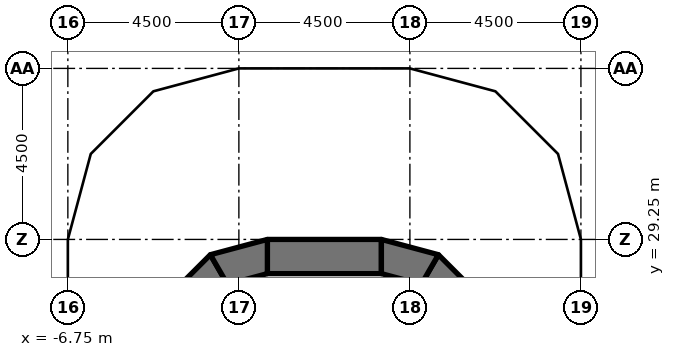
"""IFC4 building model, lengths in metres.
Left out: names, types, materials, properties, quantities, classifications, styles, units other than length and angle.
Written with IfcOpenShell. Run it as: python <this file> out.ifc"""

import sys

from ifc_helpers import new_model, si_unit, direction, frame, frame_2d, origin, origin_2d, place, context, subcontext, project, spatial, polyline, rectangle, outline, extrude, element, save


model = new_model("IFC4")
c1 = context("Model", 3, precision=1e-05, world=origin(), true_north=direction((0.0, 1.0)))
c2 = subcontext(c1, "Body", "Model", "MODEL_VIEW")
j1 = project(units=[si_unit("LENGTHUNIT", "METRE"), si_unit("PLANEANGLEUNIT", "RADIAN")], contexts=[c1])
p1 = place(None, origin())
s1 = spatial("IfcSite", under=j1, at=p1, CompositionType="ELEMENT")
p2 = place(p1, origin())
s2 = spatial("IfcBuilding", under=s1, at=p2, CompositionType="ELEMENT")
p3 = place(p2, frame((0.0, 0.0, 27.0)))
s3 = spatial("IfcBuildingStorey", under=s2, at=p3, CompositionType="ELEMENT", Elevation=27.0)
for number, where, z_axis, x_axis in (
    (1, (-2.25, 33.11, 0.0), (0.0, 0.0, 1.0), (1.0, 0.0, 0.0)),
    (2, (2.25, 33.11, 0.0), (0.0, 0.0, 1.0), (1.0, 0.0, 0.0)),
):
    element("IfcColumn", number, at=place(p3, frame(where, z_axis=z_axis, x_axis=x_axis)), inside=s3, PredefinedType="COLUMN", context=c2, shape_type="SweptSolid", body=[
        extrude(rectangle(XDim=1.0, YDim=1.0, at=origin_2d()), origin(), (0.0, 0.0, 1.0), 4.05),
    ])
p4 = place(p3, frame((-1.5, 28.8, 0.0), z_axis=(0.0, 0.0, 1.0), x_axis=(1.0, 0.0, 0.0)))
e3 = element("IfcWall", 3, at=p4, inside=s3, PredefinedType="SHEAR", context=c2, shape_type="SweptSolid", body=[
    extrude(rectangle(XDim=3.0, YDim=0.9, at=frame_2d((1.5, 0.0))), origin(), (0.0, 0.0, 1.0), 4.2),
])
p5 = place(p3, origin())
e4 = element("IfcWall", 4, at=p5, inside=s3, PredefinedType="SHEAR", context=c2, shape_type="SweptSolid", body=[
    extrude(outline(polyline([(-4.098, 27.75), (-3.0, 28.848), (-2.55, 28.069), (-3.319, 27.3), (-4.098, 27.75)])), origin(), (0.0, 0.0, 1.0), 4.2),
])
p6 = place(p3, origin())
e5 = element("IfcWall", 5, at=p6, inside=s3, PredefinedType="SHEAR", context=c2, shape_type="SweptSolid", body=[
    extrude(outline(polyline([(-3.0, 28.848), (-1.5, 29.25), (-1.5, 28.35), (-2.55, 28.069), (-3.0, 28.848)])), origin(), (0.0, 0.0, 1.0), 4.2),
])
p7 = place(p3, origin())
e6 = element("IfcWall", 6, at=p7, inside=s3, PredefinedType="SHEAR", context=c2, shape_type="SweptSolid", body=[
    extrude(outline(polyline([(4.098, 27.75), (3.0, 28.848), (2.55, 28.069), (3.319, 27.3), (4.098, 27.75)])), origin(), (0.0, 0.0, 1.0), 4.2),
])
p8 = place(p3, origin())
e7 = element("IfcWall", 7, at=p8, inside=s3, PredefinedType="SHEAR", context=c2, shape_type="SweptSolid", body=[
    extrude(outline(polyline([(3.0, 28.848), (1.5, 29.25), (1.5, 28.35), (2.55, 28.069), (3.0, 28.848)])), origin(), (0.0, 0.0, 1.0), 4.2),
])
save(model, sys.argv[1])
